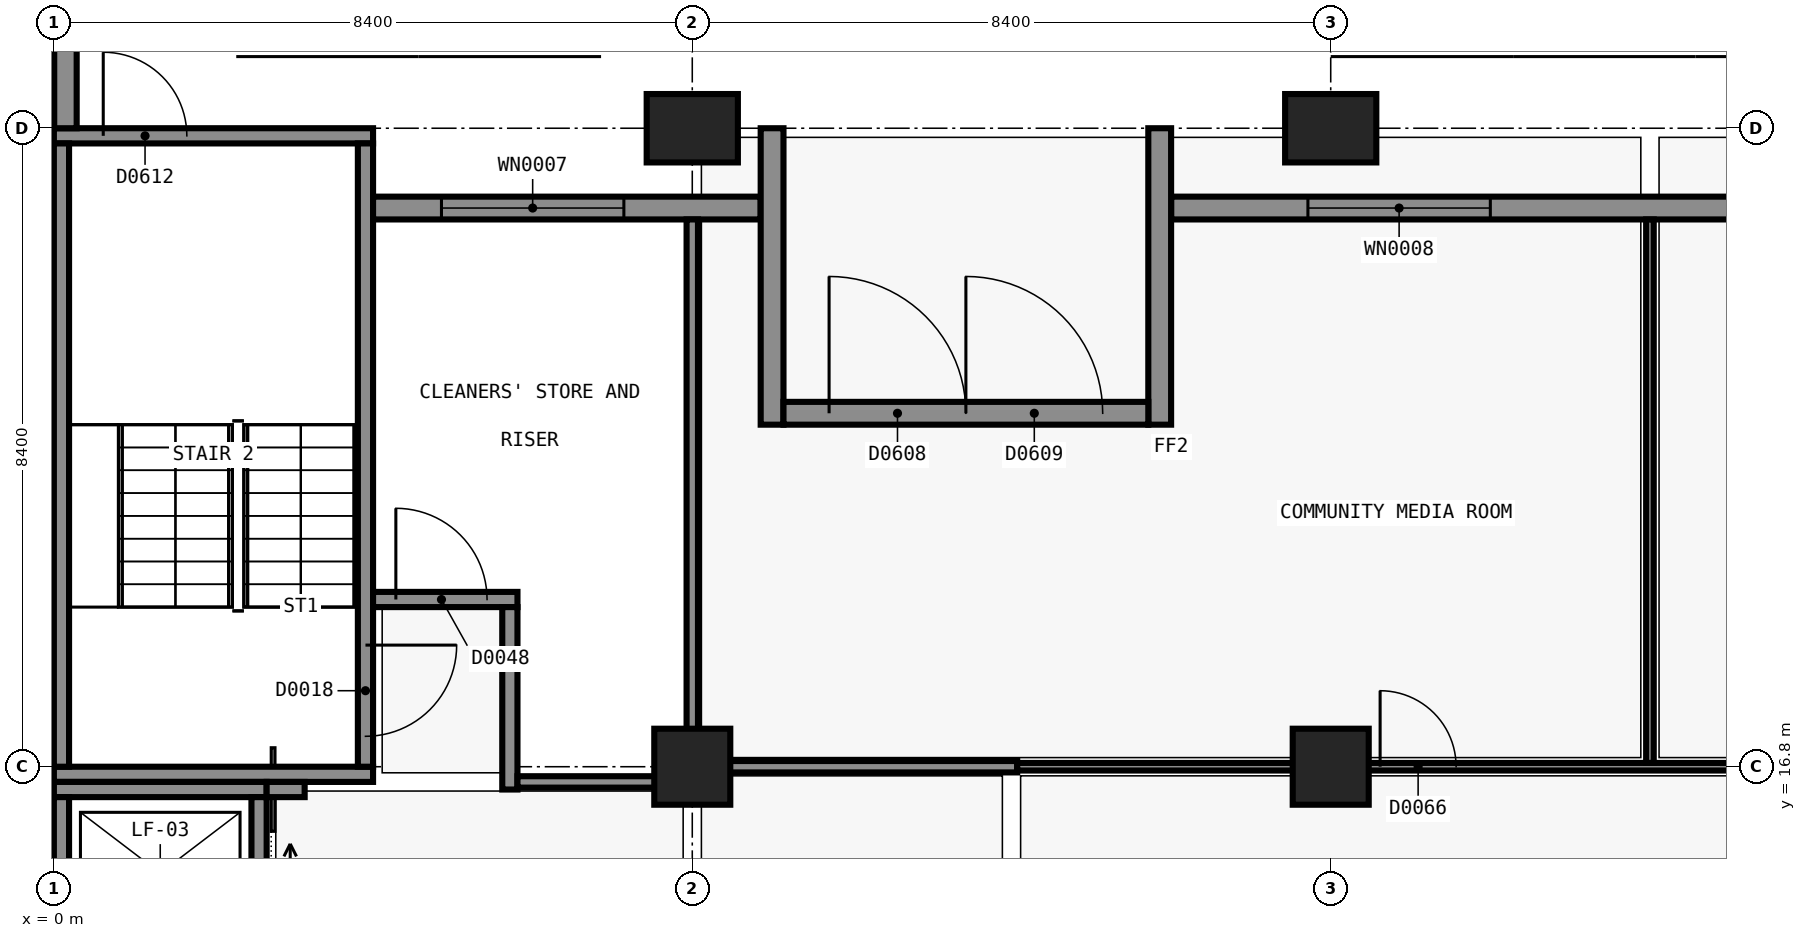
"""IFC4 building model, lengths in metres.
Left out: names, types, materials, properties, quantities, classifications, styles, units other than length and angle.
Written with IfcOpenShell. Run it as: python <this file> out.ifc"""

import sys

from ifc_helpers import new_model, si_unit, direction, frame, frame_2d, origin, origin_2d, place, context, subcontext, project, spatial, rectangle, extrude, element, fill, save


model = new_model("IFC4")
c1 = context("Model", 3, precision=1e-05, world=origin(), true_north=direction((0.0, 1.0)))
c2 = subcontext(c1, "Body", "Model", "MODEL_VIEW")
j1 = project(units=[si_unit("LENGTHUNIT", "METRE"), si_unit("PLANEANGLEUNIT", "RADIAN")], contexts=[c1])
p1 = place(None, origin())
s1 = spatial("IfcSite", under=j1, at=p1, CompositionType="ELEMENT")
p2 = place(p1, origin())
s2 = spatial("IfcBuilding", under=s1, at=p2, CompositionType="ELEMENT")
p3 = place(p2, origin())
s3 = spatial("IfcBuildingStorey", under=s2, at=p3, CompositionType="ELEMENT", Elevation=0.0)
p4 = place(p3, frame((4.2, 16.7, -0.3), z_axis=(0.0, 0.0, 1.0), x_axis=(-1.0, 0.0, 0.0)))
e1 = element("IfcWall", 1, at=p4, inside=s3, PredefinedType="SHEAR", context=c2, shape_type="SweptSolid", body=[
    extrude(rectangle(XDim=4.199, YDim=0.2, at=frame_2d((2.1, 0.0))), origin(), (0.0, 0.0, 1.0), 5.7),
])
p5 = place(p3, frame((0.0, 25.1, -0.3), z_axis=(0.0, 0.0, 1.0), x_axis=(1.0, 0.0, 0.0)))
e2 = element("IfcWall", 2, at=p5, inside=s3, PredefinedType="SHEAR", context=c2, shape_type="SweptSolid", body=[
    extrude(rectangle(XDim=4.199, YDim=0.2, at=frame_2d((2.1, 0.0))), origin(), (0.0, 0.0, 1.0), 5.7),
])
p6 = place(p5, frame((0.649, 0.0, 0.0)))
e3 = element("IfcOpeningElement", 3, at=p6, cuts=e2, PredefinedType="OPENING", context=c2, shape_type="SweptSolid", body=[
    extrude(rectangle(XDim=1.1, YDim=2.2, at=frame_2d((0.55, 1.1))), frame((0.0, 0.11, 0.0), z_axis=(0.0, -1.0, 0.0), x_axis=(1.0, 0.0, 0.0)), (0.0, 0.0, 1.0), 0.22),
])
p7 = place(p3, frame((0.1, 16.8, -0.3), z_axis=(0.0, 0.0, 1.0), x_axis=(0.0, 1.0, 0.0)))
e4 = element("IfcWall", 4, at=p7, inside=s3, PredefinedType="SHEAR", context=c2, shape_type="SweptSolid", body=[
    extrude(rectangle(XDim=8.2, YDim=0.2, at=frame_2d((4.1, 0.0))), origin(), (0.0, 0.0, 1.0), 5.7),
])
p8 = place(p3, frame((4.1, 25.0, -0.3), z_axis=(0.0, 0.0, 1.0), x_axis=(0.0, -1.0, 0.0)))
e5 = element("IfcWall", 5, at=p8, inside=s3, PredefinedType="SHEAR", context=c2, shape_type="SweptSolid", body=[
    extrude(rectangle(XDim=8.2, YDim=0.2, at=frame_2d((4.1, 0.0))), origin(), (0.0, 0.0, 1.0), 5.7),
])
p9 = place(p8, frame((6.6, 0.0, 0.3)))
e6 = element("IfcOpeningElement", 6, at=p9, cuts=e5, PredefinedType="OPENING", context=c2, shape_type="SweptSolid", body=[
    extrude(rectangle(XDim=1.2, YDim=2.1, at=frame_2d((0.6, 1.05))), frame((0.0, 0.11, 0.0), z_axis=(0.0, -1.0, 0.0), x_axis=(1.0, 0.0, 0.0)), (0.0, 0.0, 1.0), 0.22),
])
p10 = place(p3, frame((0.0, 16.5, -1.6), z_axis=(0.0, 0.0, 1.0), x_axis=(1.0, 0.0, 0.0)))
e7 = element("IfcWall", 7, at=p10, inside=s3, PredefinedType="SHEAR", context=c2, shape_type="SweptSolid", body=[
    extrude(rectangle(XDim=2.8, YDim=0.2, at=frame_2d((1.4, 0.0))), origin(), (0.0, 0.0, 1.0), 7.0),
])
p11 = place(p3, frame((0.1, 14.3, -1.6), z_axis=(0.0, 0.0, 1.0), x_axis=(0.0, 1.0, 0.0)))
e8 = element("IfcWall", 8, at=p11, inside=s3, PredefinedType="SHEAR", context=c2, shape_type="SweptSolid", body=[
    extrude(rectangle(XDim=2.1, YDim=0.2, at=frame_2d((1.05, 0.0))), origin(), (0.0, 0.0, 1.0), 7.0),
])
p12 = place(p3, frame((2.7, 16.4, -1.6), z_axis=(0.0, 0.0, 1.0), x_axis=(0.0, -1.0, 0.0)))
e9 = element("IfcWall", 9, at=p12, inside=s3, PredefinedType="SHEAR", context=c2, shape_type="SweptSolid", body=[
    extrude(rectangle(XDim=2.1, YDim=0.2, at=frame_2d((1.05, 0.0))), origin(), (0.0, 0.0, 1.0), 7.0),
])
p13 = place(p12, frame((0.45, 0.0, 1.6)))
e10 = element("IfcOpeningElement", 10, at=p13, cuts=e9, PredefinedType="OPENING", context=c2, shape_type="SweptSolid", body=[
    extrude(rectangle(XDim=1.1, YDim=2.1, at=frame_2d((0.55, 1.05))), frame((0.0, 0.11, 0.0), z_axis=(0.0, -1.0, 0.0), x_axis=(1.0, 0.0, 0.0)), (0.0, 0.0, 1.0), 0.22),
])
p14 = place(p3, frame((8.4, 16.8, -0.3), z_axis=(0.0, 0.0, 1.0), x_axis=(1.0, 0.0, 0.0)))
e11 = element("IfcColumn", 11, at=p14, inside=s3, PredefinedType="COLUMN", context=c2, shape_type="SweptSolid", body=[
    extrude(rectangle(XDim=1.0, YDim=1.0, at=origin_2d()), origin(), (0.0, 0.0, 1.0), 5.7),
])
p15 = place(p3, frame((8.4, 25.2, -0.3), z_axis=(0.0, 0.0, 1.0), x_axis=(1.0, 0.0, 0.0)))
e12 = element("IfcColumn", 12, at=p15, inside=s3, PredefinedType="COLUMN", context=c2, shape_type="SweptSolid", body=[
    extrude(rectangle(XDim=1.2, YDim=0.9, at=origin_2d()), origin(), (0.0, 0.0, 1.0), 5.7),
])
p16 = place(p3, frame((16.8, 16.8, -0.3), z_axis=(0.0, 0.0, 1.0), x_axis=(1.0, 0.0, 0.0)))
e13 = element("IfcColumn", 13, at=p16, inside=s3, PredefinedType="COLUMN", context=c2, shape_type="SweptSolid", body=[
    extrude(rectangle(XDim=1.0, YDim=1.0, at=origin_2d()), origin(), (0.0, 0.0, 1.0), 5.7),
])
p17 = place(p3, frame((16.8, 25.2, -0.3), z_axis=(0.0, 0.0, 1.0), x_axis=(1.0, 0.0, 0.0)))
e14 = element("IfcColumn", 14, at=p17, inside=s3, PredefinedType="COLUMN", context=c2, shape_type="SweptSolid", body=[
    extrude(rectangle(XDim=1.2, YDim=0.9, at=origin_2d()), origin(), (0.0, 0.0, 1.0), 5.7),
])
p18 = place(p3, frame((2.8, 16.5, -0.3), z_axis=(0.0, 0.0, 1.0), x_axis=(1.0, 0.0, 0.0)))
e15 = element("IfcWall", 15, at=p18, inside=s3, PredefinedType="SHEAR", context=c2, shape_type="SweptSolid", body=[
    extrude(rectangle(XDim=0.5, YDim=0.2, at=frame_2d((0.25, 0.0))), origin(), (0.0, 0.0, 1.0), 5.7),
])
p19 = place(p3, frame((0.15, 25.2, -1.2), z_axis=(0.0, 0.0, 1.0), x_axis=(0.0, 1.0, 0.0)))
e16 = element("IfcWall", 16, at=p19, inside=s3, PredefinedType="SOLIDWALL", context=c2, shape_type="SweptSolid", body=[
    extrude(rectangle(XDim=8.4, YDim=0.3, at=frame_2d((4.2, 0.0))), origin(), (0.0, 0.0, 1.0), 0.9),
])
p20 = place(p3, frame((4.2, 24.15, 0.0), z_axis=(0.0, 0.0, 1.0), x_axis=(1.0, 0.0, 0.0)))
e17 = element("IfcWall", 17, at=p20, inside=s3, PredefinedType="SOLIDWALL", context=c2, shape_type="SweptSolid", body=[
    extrude(rectangle(XDim=5.1, YDim=0.3, at=frame_2d((2.55, 0.0))), origin(), (0.0, 0.0, 1.0), 5.1),
])
p21 = place(p20, frame((0.9, 0.0, 0.45)))
e18 = element("IfcOpeningElement", 18, at=p21, cuts=e17, PredefinedType="OPENING", context=c2, shape_type="SweptSolid", body=[
    extrude(rectangle(XDim=2.4, YDim=3.0, at=frame_2d((1.2, 1.5))), frame((0.0, 0.16, 0.0), z_axis=(0.0, -1.0, 0.0), x_axis=(1.0, 0.0, 0.0)), (0.0, 0.0, 1.0), 0.32),
])
p22 = place(p3, frame((14.7, 24.15, 0.0), z_axis=(0.0, 0.0, 1.0), x_axis=(1.0, 0.0, 0.0)))
e19 = element("IfcWall", 19, at=p22, inside=s3, PredefinedType="SOLIDWALL", context=c2, shape_type="SweptSolid", body=[
    extrude(rectangle(XDim=11.4, YDim=0.3, at=frame_2d((5.7, 0.0))), origin(), (0.0, 0.0, 1.0), 5.1),
])
p23 = place(p22, frame((1.8, 0.0, 0.45)))
e20 = element("IfcOpeningElement", 20, at=p23, cuts=e19, PredefinedType="OPENING", context=c2, shape_type="SweptSolid", body=[
    extrude(rectangle(XDim=2.4, YDim=3.0, at=frame_2d((1.2, 1.5))), frame((0.0, 0.16, 0.0), z_axis=(0.0, -1.0, 0.0), x_axis=(1.0, 0.0, 0.0)), (0.0, 0.0, 1.0), 0.32),
])
p24 = place(p22, frame((7.8, 0.0, 0.45)))
e21 = element("IfcOpeningElement", 21, at=p24, cuts=e19, PredefinedType="OPENING", context=c2, shape_type="SweptSolid", body=[
    extrude(rectangle(XDim=2.4, YDim=3.0, at=frame_2d((1.2, 1.5))), frame((0.0, 0.16, 0.0), z_axis=(0.0, -1.0, 0.0), x_axis=(1.0, 0.0, 0.0)), (0.0, 0.0, 1.0), 0.32),
])
for number, where, z_axis, x_axis in (
    (22, (9.45, 21.3, 0.0), (0.0, 0.0, 1.0), (0.0, 1.0, 0.0)),
    (23, (14.55, 21.3, 0.0), (0.0, 0.0, 1.0), (0.0, 1.0, 0.0)),
):
    element("IfcWall", number, at=place(p3, frame(where, z_axis=z_axis, x_axis=x_axis)), inside=s3, PredefinedType="SOLIDWALL", context=c2, shape_type="SweptSolid", body=[
        extrude(rectangle(XDim=3.9, YDim=0.3, at=frame_2d((1.95, 0.0))), origin(), (0.0, 0.0, 1.0), 5.1),
    ])
p25 = place(p3, frame((9.6, 21.45, 0.0), z_axis=(0.0, 0.0, 1.0), x_axis=(1.0, 0.0, 0.0)))
e24 = element("IfcWall", 24, at=p25, inside=s3, PredefinedType="SOLIDWALL", context=c2, shape_type="SweptSolid", body=[
    extrude(rectangle(XDim=4.8, YDim=0.3, at=frame_2d((2.4, 0.0))), origin(), (0.0, 0.0, 1.0), 5.1),
])
p26 = place(p25, frame((0.6, 0.0, 0.0)))
e25 = element("IfcOpeningElement", 25, at=p26, cuts=e24, PredefinedType="OPENING", context=c2, shape_type="SweptSolid", body=[
    extrude(rectangle(XDim=1.8, YDim=2.4, at=frame_2d((0.9, 1.2))), frame((0.0, 0.16, 0.0), z_axis=(0.0, -1.0, 0.0), x_axis=(1.0, 0.0, 0.0)), (0.0, 0.0, 1.0), 0.32),
])
p27 = place(p25, frame((2.4, 0.0, 0.0)))
e26 = element("IfcOpeningElement", 26, at=p27, cuts=e24, PredefinedType="OPENING", context=c2, shape_type="SweptSolid", body=[
    extrude(rectangle(XDim=1.8, YDim=2.4, at=frame_2d((0.9, 1.2))), frame((0.0, 0.16, 0.0), z_axis=(0.0, -1.0, 0.0), x_axis=(1.0, 0.0, 0.0)), (0.0, 0.0, 1.0), 0.32),
])
p28 = place(p3, frame((4.2, 19.0, 0.0), z_axis=(0.0, 0.0, 1.0), x_axis=(1.0, 0.0, 0.0)))
e27 = element("IfcWall", 27, at=p28, inside=s3, PredefinedType="SOLIDWALL", context=c2, shape_type="SweptSolid", body=[
    extrude(rectangle(XDim=1.9, YDim=0.2, at=frame_2d((0.95, 0.0))), origin(), (0.0, 0.0, 1.0), 5.1),
])
p29 = place(p28, frame((0.3, 0.0, 0.0)))
e28 = element("IfcOpeningElement", 28, at=p29, cuts=e27, PredefinedType="OPENING", context=c2, shape_type="SweptSolid", body=[
    extrude(rectangle(XDim=1.2, YDim=2.1, at=frame_2d((0.6, 1.05))), frame((0.0, 0.11, 0.0), z_axis=(0.0, -1.0, 0.0), x_axis=(1.0, 0.0, 0.0)), (0.0, 0.0, 1.0), 0.22),
])
p30 = place(p3, frame((6.0, 16.5, 0.0), z_axis=(0.0, 0.0, 1.0), x_axis=(0.0, 1.0, 0.0)))
e29 = element("IfcWall", 29, at=p30, inside=s3, PredefinedType="SOLIDWALL", context=c2, shape_type="SweptSolid", body=[
    extrude(rectangle(XDim=2.4, YDim=0.2, at=frame_2d((1.2, 0.0))), origin(), (0.0, 0.0, 1.0), 4.6),
])
p31 = place(p3, frame((8.325, 16.8, 0.0), z_axis=(0.0, 0.0, 1.0), x_axis=(1.0, 0.0, 0.0)))
e30 = element("IfcWall", 30, at=p31, inside=s3, PredefinedType="PARTITIONING", context=c2, shape_type="SweptSolid", body=[
    extrude(rectangle(XDim=4.35, YDim=0.15, at=frame_2d((2.175, 0.0))), origin(), (0.0, 0.0, 1.0), 4.4),
])
p32 = place(p3, frame((6.1, 16.6, 0.0), z_axis=(0.0, 0.0, 1.0), x_axis=(1.0, 0.0, 0.0)))
e31 = element("IfcWall", 31, at=p32, inside=s3, PredefinedType="SOLIDWALL", context=c2, shape_type="SweptSolid", body=[
    extrude(rectangle(XDim=2.375, YDim=0.15, at=frame_2d((1.188, 0.0))), origin(), (0.0, 0.0, 1.0), 4.4),
])
p33 = place(p3, frame((8.4, 16.875, 0.0), z_axis=(0.0, 0.0, 1.0), x_axis=(0.0, 1.0, 0.0)))
e32 = element("IfcWall", 32, at=p33, inside=s3, PredefinedType="SOLIDWALL", context=c2, shape_type="SweptSolid", body=[
    extrude(rectangle(XDim=7.125, YDim=0.15, at=frame_2d((3.562, 0.0))), origin(), (0.0, 0.0, 1.0), 4.4),
])
p34 = place(p3, frame((12.675, 16.8, 0.0), z_axis=(0.0, 0.0, 1.0), x_axis=(1.0, 0.0, 0.0)))
e33 = element("IfcWall", 33, at=p34, inside=s3, PredefinedType="PARTITIONING", context=c2, shape_type="SweptSolid", body=[
    extrude(rectangle(XDim=12.45, YDim=0.1, at=frame_2d((6.225, 0.0))), origin(), (0.0, 0.0, 1.0), 4.4),
])
p35 = place(p34, frame((4.775, 0.0, 0.0)))
e34 = element("IfcOpeningElement", 34, at=p35, cuts=e33, PredefinedType="OPENING", context=c2, shape_type="SweptSolid", body=[
    extrude(rectangle(XDim=1.0, YDim=2.1, at=frame_2d((0.5, 1.05))), frame((0.0, 0.06, 0.0), z_axis=(0.0, -1.0, 0.0), x_axis=(1.0, 0.0, 0.0)), (0.0, 0.0, 1.0), 0.12),
])
p36 = place(p3, frame((21.0, 16.85, 0.0), z_axis=(0.0, 0.0, 1.0), x_axis=(0.0, 1.0, 0.0)))
e35 = element("IfcWall", 35, at=p36, inside=s3, PredefinedType="PARTITIONING", context=c2, shape_type="SweptSolid", body=[
    extrude(rectangle(XDim=7.15, YDim=0.1, at=frame_2d((3.575, 0.0))), origin(), (0.0, 0.0, 1.0), 4.4),
])
p37 = place(p21, origin())
e36 = element("IfcWindow", 36, at=p37, inside=s3, PartitioningType="SINGLE_PANEL", PredefinedType="WINDOW", context=c2, shape_type="SweptSolid", body=[
    extrude(rectangle(XDim=2.4, YDim=3.0, at=frame_2d((1.2, 1.5))), frame((0.0, 0.03, 0.0), z_axis=(0.0, -1.0, 0.0), x_axis=(1.0, 0.0, 0.0)), (0.0, 0.0, 1.0), 0.06),
])
fill(e18, e36)
p38 = place(p23, origin())
e37 = element("IfcWindow", 37, at=p38, inside=s3, PartitioningType="SINGLE_PANEL", PredefinedType="WINDOW", context=c2, shape_type="SweptSolid", body=[
    extrude(rectangle(XDim=2.4, YDim=3.0, at=frame_2d((1.2, 1.5))), frame((0.0, 0.03, 0.0), z_axis=(0.0, -1.0, 0.0), x_axis=(1.0, 0.0, 0.0)), (0.0, 0.0, 1.0), 0.06),
])
fill(e20, e37)
p39 = place(p26, origin())
e38 = element("IfcDoor", 38, at=p39, inside=s3, OperationType="SINGLE_SWING_LEFT", PredefinedType="DOOR", context=c2, shape_type="SweptSolid", body=[
    extrude(rectangle(XDim=1.8, YDim=2.4, at=frame_2d((0.9, 1.2))), frame((0.0, 0.025, 0.0), z_axis=(0.0, -1.0, 0.0), x_axis=(1.0, 0.0, 0.0)), (0.0, 0.0, 1.0), 0.05),
])
fill(e25, e38)
p40 = place(p27, origin())
e39 = element("IfcDoor", 39, at=p40, inside=s3, OperationType="SINGLE_SWING_LEFT", PredefinedType="DOOR", context=c2, shape_type="SweptSolid", body=[
    extrude(rectangle(XDim=1.8, YDim=2.4, at=frame_2d((0.9, 1.2))), frame((0.0, 0.025, 0.0), z_axis=(0.0, -1.0, 0.0), x_axis=(1.0, 0.0, 0.0)), (0.0, 0.0, 1.0), 0.05),
])
fill(e26, e39)
p41 = place(p6, origin())
e40 = element("IfcDoor", 40, at=p41, inside=s3, OperationType="SINGLE_SWING_LEFT", PredefinedType="DOOR", context=c2, shape_type="SweptSolid", body=[
    extrude(rectangle(XDim=1.1, YDim=2.2, at=frame_2d((0.55, 1.1))), frame((0.0, 0.025, 0.0), z_axis=(0.0, -1.0, 0.0), x_axis=(1.0, 0.0, 0.0)), (0.0, 0.0, 1.0), 0.05),
])
fill(e3, e40)
p42 = place(p13, origin())
e41 = element("IfcDoor", 41, at=p42, inside=s3, OperationType="SLIDING_TO_LEFT", PredefinedType="DOOR", context=c2, shape_type="SweptSolid", body=[
    extrude(rectangle(XDim=1.1, YDim=2.1, at=frame_2d((0.55, 1.05))), frame((0.0, 0.025, 0.0), z_axis=(0.0, -1.0, 0.0), x_axis=(1.0, 0.0, 0.0)), (0.0, 0.0, 1.0), 0.05),
])
fill(e10, e41)
p43 = place(p9, origin())
e42 = element("IfcDoor", 42, at=p43, inside=s3, OperationType="SINGLE_SWING_RIGHT", PredefinedType="DOOR", context=c2, shape_type="SweptSolid", body=[
    extrude(rectangle(XDim=1.2, YDim=2.1, at=frame_2d((0.6, 1.05))), frame((0.0, 0.025, 0.0), z_axis=(0.0, -1.0, 0.0), x_axis=(1.0, 0.0, 0.0)), (0.0, 0.0, 1.0), 0.05),
])
fill(e6, e42)
p44 = place(p29, origin())
e43 = element("IfcDoor", 43, at=p44, inside=s3, OperationType="SINGLE_SWING_LEFT", PredefinedType="DOOR", context=c2, shape_type="SweptSolid", body=[
    extrude(rectangle(XDim=1.2, YDim=2.1, at=frame_2d((0.6, 1.05))), frame((0.0, 0.025, 0.0), z_axis=(0.0, -1.0, 0.0), x_axis=(1.0, 0.0, 0.0)), (0.0, 0.0, 1.0), 0.05),
])
fill(e28, e43)
p45 = place(p35, origin())
e44 = element("IfcDoor", 44, at=p45, inside=s3, OperationType="SINGLE_SWING_RIGHT", PredefinedType="DOOR", context=c2, shape_type="SweptSolid", body=[
    extrude(rectangle(XDim=1.0, YDim=2.1, at=frame_2d((0.5, 1.05))), frame((0.0, 0.025, 0.0), z_axis=(0.0, -1.0, 0.0), x_axis=(1.0, 0.0, 0.0)), (0.0, 0.0, 1.0), 0.05),
])
fill(e34, e44)
save(model, sys.argv[1])
